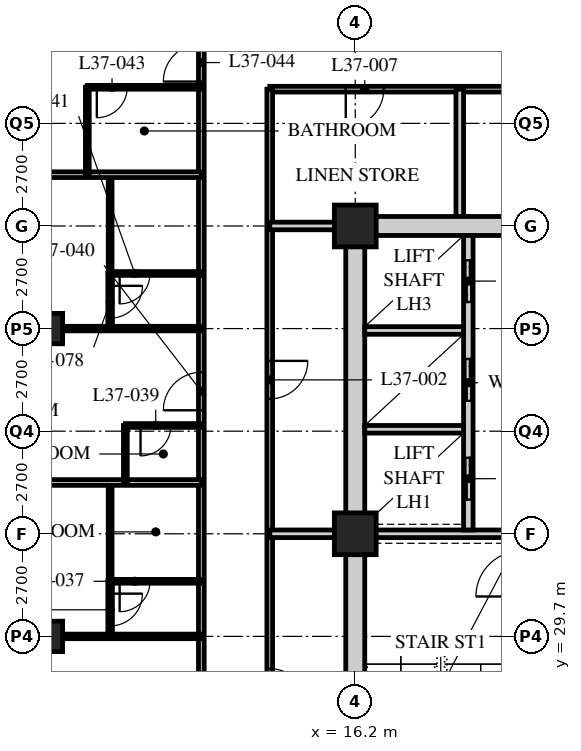
"""IFC4 building model, lengths in metres.
Left out: names, types, materials, properties, quantities, classifications, styles, units other than length and angle.
Written with IfcOpenShell. Run it as: python <this file> out.ifc"""

import sys

from ifc_helpers import new_model, si_unit, direction, frame, frame_2d, origin, origin_2d, place, context, subcontext, project, spatial, rectangle, hollow_rectangle, extrude, element, fill, save


model = new_model("IFC4")
c1 = context("Model", 3, precision=1e-05, world=origin(), true_north=direction((0.0, 1.0)))
c2 = subcontext(c1, "Body", "Model", "MODEL_VIEW")
j1 = project(units=[si_unit("LENGTHUNIT", "METRE"), si_unit("PLANEANGLEUNIT", "RADIAN")], contexts=[c1])
p1 = place(None, origin())
s1 = spatial("IfcSite", under=j1, at=p1, CompositionType="ELEMENT")
p2 = place(p1, origin())
s2 = spatial("IfcBuilding", under=s1, at=p2, CompositionType="ELEMENT")
p3 = place(p2, frame((0.0, 0.0, 144.2)))
s3 = spatial("IfcBuildingStorey", under=s2, at=p3, CompositionType="ELEMENT", Elevation=144.2)
for number, where, z_axis, x_axis in (
    (1, (8.1, 29.7, 0.0), (0.0, 0.0, 1.0), (1.0, 0.0, 0.0)),
    (2, (8.1, 37.8, 0.0), (0.0, 0.0, 1.0), (1.0, 0.0, 0.0)),
):
    element("IfcColumn", number, at=place(p3, frame(where, z_axis=z_axis, x_axis=x_axis)), inside=s3, PredefinedType="COLUMN", context=c2, shape_type="SweptSolid", body=[
        extrude(hollow_rectangle(XDim=0.8, YDim=0.8, WallThickness=0.08, at=origin_2d()), origin(), (0.0, 0.0, 1.0), 3.4),
    ])
for number, where, z_axis, x_axis in (
    (3, (16.2, 32.4, 0.0), (0.0, 0.0, 1.0), (1.0, 0.0, 0.0)),
    (4, (16.2, 40.5, 0.0), (0.0, 0.0, 1.0), (1.0, 0.0, 0.0)),
):
    element("IfcColumn", number, at=place(p3, frame(where, z_axis=z_axis, x_axis=x_axis)), inside=s3, PredefinedType="COLUMN", context=c2, shape_type="SweptSolid", body=[
        extrude(hollow_rectangle(XDim=1.1, YDim=1.1, WallThickness=0.1, at=origin_2d()), origin(), (0.0, 0.0, 1.0), 3.4),
    ])
p4 = place(p3, frame((12.15, 21.6, 0.0), z_axis=(0.0, 0.0, 1.0), x_axis=(0.0, 1.0, 0.0)))
e5 = element("IfcWall", 5, at=p4, inside=s3, PredefinedType="PARTITIONING", context=c2, shape_type="SweptSolid", body=[
    extrude(rectangle(XDim=24.3, YDim=0.15, at=frame_2d((12.15, 0.0))), origin(), (0.0, 0.0, 1.0), 3.19),
])
p5 = place(p4, frame((5.575, 0.0, 0.0)))
e6 = element("IfcOpeningElement", 6, at=p5, cuts=e5, PredefinedType="OPENING", context=c2, shape_type="SweptSolid", body=[
    extrude(rectangle(XDim=1.0, YDim=2.1, at=frame_2d((0.5, 1.05))), frame((0.0, 0.085, 0.0), z_axis=(0.0, -1.0, 0.0), x_axis=(1.0, 0.0, 0.0)), (0.0, 0.0, 1.0), 0.17),
])
p6 = place(p4, frame((14.05, 0.0, 0.0)))
e7 = element("IfcOpeningElement", 7, at=p6, cuts=e5, PredefinedType="OPENING", context=c2, shape_type="SweptSolid", body=[
    extrude(rectangle(XDim=1.0, YDim=2.1, at=frame_2d((0.5, 1.05))), frame((0.0, 0.085, 0.0), z_axis=(0.0, -1.0, 0.0), x_axis=(1.0, 0.0, 0.0)), (0.0, 0.0, 1.0), 0.17),
])
p7 = place(p4, frame((22.7, 0.0, 0.0)))
e8 = element("IfcOpeningElement", 8, at=p7, cuts=e5, PredefinedType="OPENING", context=c2, shape_type="SweptSolid", body=[
    extrude(rectangle(XDim=1.0, YDim=2.1, at=frame_2d((0.5, 1.05))), frame((0.0, 0.085, 0.0), z_axis=(0.0, -1.0, 0.0), x_axis=(1.0, 0.0, 0.0)), (0.0, 0.0, 1.0), 0.17),
])
p8 = place(p3, frame((27.14, 44.1, 0.0), z_axis=(0.0, 0.0, 1.0), x_axis=(-1.0, 0.0, 0.0)))
e9 = element("IfcWall", 9, at=p8, inside=s3, PredefinedType="PARTITIONING", context=c2, shape_type="SweptSolid", body=[
    extrude(rectangle(XDim=13.19, YDim=0.15, at=frame_2d((6.595, 0.0))), origin(), (0.0, 0.0, 1.0), 3.19),
])
p9 = place(p8, frame((10.19, 0.0, 0.0)))
e10 = element("IfcOpeningElement", 10, at=p9, cuts=e9, PredefinedType="OPENING", context=c2, shape_type="SweptSolid", body=[
    extrude(rectangle(XDim=1.0, YDim=2.1, at=frame_2d((0.5, 1.05))), frame((0.0, 0.085, 0.0), z_axis=(0.0, -1.0, 0.0), x_axis=(1.0, 0.0, 0.0)), (0.0, 0.0, 1.0), 0.17),
])
p10 = place(p8, frame((3.59, 0.0, 0.0)))
e11 = element("IfcOpeningElement", 11, at=p10, cuts=e9, PredefinedType="OPENING", context=c2, shape_type="SweptSolid", body=[
    extrude(rectangle(XDim=1.0, YDim=2.1, at=frame_2d((0.5, 1.05))), frame((0.0, 0.085, 0.0), z_axis=(0.0, -1.0, 0.0), x_axis=(1.0, 0.0, 0.0)), (0.0, 0.0, 1.0), 0.17),
])
p11 = place(p3, frame((13.95, 44.1, 0.0), z_axis=(0.0, 0.0, 1.0), x_axis=(0.0, -1.0, 0.0)))
e12 = element("IfcWall", 12, at=p11, inside=s3, PredefinedType="PARTITIONING", context=c2, shape_type="SweptSolid", body=[
    extrude(rectangle(XDim=19.8, YDim=0.15, at=frame_2d((9.9, 0.0))), origin(), (0.0, 0.0, 1.0), 3.19),
])
p12 = place(p11, frame((15.25, 0.0, 0.0)))
e13 = element("IfcOpeningElement", 13, at=p12, cuts=e12, PredefinedType="OPENING", context=c2, shape_type="SweptSolid", body=[
    extrude(rectangle(XDim=1.0, YDim=2.1, at=frame_2d((0.5, 1.05))), frame((0.0, 0.085, 0.0), z_axis=(0.0, -1.0, 0.0), x_axis=(1.0, 0.0, 0.0)), (0.0, 0.0, 1.0), 0.17),
])
p13 = place(p11, frame((7.15, 0.0, 0.0)))
e14 = element("IfcOpeningElement", 14, at=p13, cuts=e12, PredefinedType="OPENING", context=c2, shape_type="SweptSolid", body=[
    extrude(rectangle(XDim=1.0, YDim=2.1, at=frame_2d((0.5, 1.05))), frame((0.0, 0.085, 0.0), z_axis=(0.0, -1.0, 0.0), x_axis=(1.0, 0.0, 0.0)), (0.0, 0.0, 1.0), 0.17),
])
p14 = place(p3, frame((13.95, 32.4, 0.0), z_axis=(0.0, 0.0, 1.0), x_axis=(1.0, 0.0, 0.0)))
e15 = element("IfcWall", 15, at=p14, inside=s3, PredefinedType="SOLIDWALL", context=c2, shape_type="SweptSolid", body=[
    extrude(rectangle(XDim=2.25, YDim=0.2, at=frame_2d((1.125, 0.0))), origin(), (0.0, 0.0, 1.0), 3.19),
])
p15 = place(p3, frame((18.95, 44.1, 0.0), z_axis=(0.0, 0.0, 1.0), x_axis=(0.0, -1.0, 0.0)))
e16 = element("IfcWall", 16, at=p15, inside=s3, PredefinedType="SOLIDWALL", context=c2, shape_type="SweptSolid", body=[
    extrude(rectangle(XDim=3.6, YDim=0.2, at=frame_2d((1.8, 0.0))), origin(), (0.0, 0.0, 1.0), 3.19),
])
p16 = place(p3, frame((13.95, 40.5, 0.0), z_axis=(0.0, 0.0, 1.0), x_axis=(1.0, 0.0, 0.0)))
e17 = element("IfcWall", 17, at=p16, inside=s3, PredefinedType="SOLIDWALL", context=c2, shape_type="SweptSolid", body=[
    extrude(rectangle(XDim=2.25, YDim=0.2, at=frame_2d((1.125, 0.0))), origin(), (0.0, 0.0, 1.0), 3.19),
])
p17 = place(p3, frame((9.75, 31.15, 0.0), z_axis=(0.0, 0.0, 1.0), x_axis=(0.0, 1.0, 0.0)))
e18 = element("IfcWall", 18, at=p17, inside=s3, PredefinedType="PARTITIONING", context=c2, shape_type="SweptSolid", body=[
    extrude(rectangle(XDim=2.6, YDim=0.1, at=frame_2d((1.3, 0.0))), origin(), (0.0, 0.0, 1.0), 3.19),
])
p18 = place(p3, frame((12.15, 31.15, 0.0), z_axis=(0.0, 0.0, 1.0), x_axis=(-1.0, 0.0, 0.0)))
e19 = element("IfcWall", 19, at=p18, inside=s3, PredefinedType="PARTITIONING", context=c2, shape_type="SweptSolid", body=[
    extrude(rectangle(XDim=2.4, YDim=0.1, at=frame_2d((1.2, 0.0))), origin(), (0.0, 0.0, 1.0), 3.19),
])
p19 = place(p18, frame((1.35, 0.0, 0.0)))
e20 = element("IfcOpeningElement", 20, at=p19, cuts=e19, PredefinedType="OPENING", context=c2, shape_type="SweptSolid", body=[
    extrude(rectangle(XDim=0.8, YDim=2.1, at=frame_2d((0.4, 1.05))), frame((0.0, 0.06, 0.0), z_axis=(0.0, -1.0, 0.0), x_axis=(1.0, 0.0, 0.0)), (0.0, 0.0, 1.0), 0.12),
])
p20 = place(p3, frame((12.15, 29.7, 0.0), z_axis=(0.0, 0.0, 1.0), x_axis=(-1.0, 0.0, 0.0)))
e21 = element("IfcWall", 21, at=p20, inside=s3, PredefinedType="PARTITIONING", context=c2, shape_type="SweptSolid", body=[
    extrude(rectangle(XDim=11.85, YDim=0.12, at=frame_2d((5.925, 0.0))), origin(), (0.0, 0.0, 1.0), 2.42),
])
p21 = place(p20, frame((6.85, 0.0, 0.0)))
e22 = element("IfcOpeningElement", 22, at=p21, cuts=e21, PredefinedType="OPENING", context=c2, shape_type="SweptSolid", body=[
    extrude(rectangle(XDim=0.85, YDim=2.1, at=frame_2d((0.425, 1.05))), frame((0.0, 0.07, 0.0), z_axis=(0.0, -1.0, 0.0), x_axis=(1.0, 0.0, 0.0)), (0.0, 0.0, 1.0), 0.14),
])
p22 = place(p3, frame((12.15, 33.75, 0.0), z_axis=(0.0, 0.0, 1.0), x_axis=(-1.0, 0.0, 0.0)))
e23 = element("IfcWall", 23, at=p22, inside=s3, PredefinedType="PARTITIONING", context=c2, shape_type="SweptSolid", body=[
    extrude(rectangle(XDim=11.85, YDim=0.15, at=frame_2d((5.925, 0.0))), origin(), (0.0, 0.0, 1.0), 3.19),
])
p23 = place(p3, frame((10.15, 33.75, 0.0), z_axis=(0.0, 0.0, 1.0), x_axis=(0.0, 1.0, 0.0)))
e24 = element("IfcWall", 24, at=p23, inside=s3, PredefinedType="PARTITIONING", context=c2, shape_type="SweptSolid", body=[
    extrude(rectangle(XDim=1.5, YDim=0.1, at=frame_2d((0.75, 0.0))), origin(), (0.0, 0.0, 1.0), 3.19),
])
p24 = place(p3, frame((12.15, 35.25, 0.0), z_axis=(0.0, 0.0, 1.0), x_axis=(-1.0, 0.0, 0.0)))
e25 = element("IfcWall", 25, at=p24, inside=s3, PredefinedType="PARTITIONING", context=c2, shape_type="SweptSolid", body=[
    extrude(rectangle(XDim=2.0, YDim=0.1, at=frame_2d((1.0, 0.0))), origin(), (0.0, 0.0, 1.0), 3.19),
])
p25 = place(p24, frame((0.8, 0.0, 0.0)))
e26 = element("IfcOpeningElement", 26, at=p25, cuts=e25, PredefinedType="OPENING", context=c2, shape_type="SweptSolid", body=[
    extrude(rectangle(XDim=0.8, YDim=2.1, at=frame_2d((0.4, 1.05))), frame((0.0, 0.06, 0.0), z_axis=(0.0, -1.0, 0.0), x_axis=(1.0, 0.0, 0.0)), (0.0, 0.0, 1.0), 0.12),
])
p26 = place(p3, frame((9.75, 39.25, 0.0), z_axis=(0.0, 0.0, 1.0), x_axis=(0.0, 1.0, 0.0)))
e27 = element("IfcWall", 27, at=p26, inside=s3, PredefinedType="PARTITIONING", context=c2, shape_type="SweptSolid", body=[
    extrude(rectangle(XDim=2.6, YDim=0.1, at=frame_2d((1.3, 0.0))), origin(), (0.0, 0.0, 1.0), 3.19),
])
p27 = place(p3, frame((12.15, 39.25, 0.0), z_axis=(0.0, 0.0, 1.0), x_axis=(-1.0, 0.0, 0.0)))
e28 = element("IfcWall", 28, at=p27, inside=s3, PredefinedType="PARTITIONING", context=c2, shape_type="SweptSolid", body=[
    extrude(rectangle(XDim=2.4, YDim=0.1, at=frame_2d((1.2, 0.0))), origin(), (0.0, 0.0, 1.0), 3.19),
])
p28 = place(p27, frame((1.35, 0.0, 0.0)))
e29 = element("IfcOpeningElement", 29, at=p28, cuts=e28, PredefinedType="OPENING", context=c2, shape_type="SweptSolid", body=[
    extrude(rectangle(XDim=0.8, YDim=2.1, at=frame_2d((0.4, 1.05))), frame((0.0, 0.06, 0.0), z_axis=(0.0, -1.0, 0.0), x_axis=(1.0, 0.0, 0.0)), (0.0, 0.0, 1.0), 0.12),
])
p29 = place(p3, frame((12.15, 37.8, 0.0), z_axis=(0.0, 0.0, 1.0), x_axis=(-1.0, 0.0, 0.0)))
e30 = element("IfcWall", 30, at=p29, inside=s3, PredefinedType="PARTITIONING", context=c2, shape_type="SweptSolid", body=[
    extrude(rectangle(XDim=11.85, YDim=0.12, at=frame_2d((5.925, 0.0))), origin(), (0.0, 0.0, 1.0), 2.42),
])
p30 = place(p29, frame((6.85, 0.0, 0.0)))
e31 = element("IfcOpeningElement", 31, at=p30, cuts=e30, PredefinedType="OPENING", context=c2, shape_type="SweptSolid", body=[
    extrude(rectangle(XDim=0.85, YDim=2.1, at=frame_2d((0.425, 1.05))), frame((0.0, 0.07, 0.0), z_axis=(0.0, -1.0, 0.0), x_axis=(1.0, 0.0, 0.0)), (0.0, 0.0, 1.0), 0.14),
])
p31 = place(p3, frame((12.15, 41.85, 0.0), z_axis=(0.0, 0.0, 1.0), x_axis=(-1.0, 0.0, 0.0)))
e32 = element("IfcWall", 32, at=p31, inside=s3, PredefinedType="PARTITIONING", context=c2, shape_type="SweptSolid", body=[
    extrude(rectangle(XDim=11.85, YDim=0.15, at=frame_2d((5.925, 0.0))), origin(), (0.0, 0.0, 1.0), 3.19),
])
p32 = place(p3, frame((9.15, 41.85, 0.0), z_axis=(0.0, 0.0, 1.0), x_axis=(0.0, 1.0, 0.0)))
e33 = element("IfcWall", 33, at=p32, inside=s3, PredefinedType="PARTITIONING", context=c2, shape_type="SweptSolid", body=[
    extrude(rectangle(XDim=2.3, YDim=0.1, at=frame_2d((1.15, 0.0))), origin(), (0.0, 0.0, 1.0), 3.19),
])
p33 = place(p3, frame((12.15, 44.15, 0.0), z_axis=(0.0, 0.0, 1.0), x_axis=(-1.0, 0.0, 0.0)))
e34 = element("IfcWall", 34, at=p33, inside=s3, PredefinedType="PARTITIONING", context=c2, shape_type="SweptSolid", body=[
    extrude(rectangle(XDim=3.0, YDim=0.1, at=frame_2d((1.5, 0.0))), origin(), (0.0, 0.0, 1.0), 3.19),
])
p34 = place(p33, frame((1.95, 0.0, 0.0)))
e35 = element("IfcOpeningElement", 35, at=p34, cuts=e34, PredefinedType="OPENING", context=c2, shape_type="SweptSolid", body=[
    extrude(rectangle(XDim=0.8, YDim=2.1, at=frame_2d((0.4, 1.05))), frame((0.0, 0.06, 0.0), z_axis=(0.0, -1.0, 0.0), x_axis=(1.0, 0.0, 0.0)), (0.0, 0.0, 1.0), 0.12),
])
p35 = place(p3, frame((9.75, 29.7, 0.0), z_axis=(0.0, 0.0, 1.0), x_axis=(0.0, 1.0, 0.0)))
e36 = element("IfcWall", 36, at=p35, inside=s3, PredefinedType="PARTITIONING", context=c2, shape_type="SweptSolid", body=[
    extrude(rectangle(XDim=1.46, YDim=0.12, at=frame_2d((0.73, 0.0))), origin(), (0.0, 0.0, 1.0), 3.19),
])
p36 = place(p35, frame((0.275, 0.0, 0.0)))
e37 = element("IfcOpeningElement", 37, at=p36, cuts=e36, PredefinedType="OPENING", context=c2, shape_type="SweptSolid", body=[
    extrude(rectangle(XDim=0.85, YDim=2.1, at=frame_2d((0.425, 1.05))), frame((0.0, 0.07, 0.0), z_axis=(0.0, -1.0, 0.0), x_axis=(1.0, 0.0, 0.0)), (0.0, 0.0, 1.0), 0.14),
])
p37 = place(p3, frame((9.75, 37.8, 0.0), z_axis=(0.0, 0.0, 1.0), x_axis=(0.0, 1.0, 0.0)))
e38 = element("IfcWall", 38, at=p37, inside=s3, PredefinedType="PARTITIONING", context=c2, shape_type="SweptSolid", body=[
    extrude(rectangle(XDim=1.46, YDim=0.12, at=frame_2d((0.73, 0.0))), origin(), (0.0, 0.0, 1.0), 3.19),
])
p38 = place(p37, frame((0.275, 0.0, 0.0)))
e39 = element("IfcOpeningElement", 39, at=p38, cuts=e38, PredefinedType="OPENING", context=c2, shape_type="SweptSolid", body=[
    extrude(rectangle(XDim=0.85, YDim=2.1, at=frame_2d((0.425, 1.05))), frame((0.0, 0.07, 0.0), z_axis=(0.0, -1.0, 0.0), x_axis=(1.0, 0.0, 0.0)), (0.0, 0.0, 1.0), 0.14),
])
p39 = place(p3, frame((15.95, 40.5, 0.0), z_axis=(0.0, 0.0, 1.0), x_axis=(1.0, 0.0, 0.0)))
e40 = element("IfcWall", 40, at=p39, inside=s3, PredefinedType="SOLIDWALL", context=c2, shape_type="SweptSolid", body=[
    extrude(rectangle(XDim=24.8, YDim=0.5, at=frame_2d((12.4, 0.0))), origin(), (0.0, 0.0, 1.0), 2.42),
])
p40 = place(p39, frame((11.5, 0.0, 0.0)))
e41 = element("IfcOpeningElement", 41, at=p40, cuts=e40, PredefinedType="OPENING", context=c2, shape_type="SweptSolid", body=[
    extrude(rectangle(XDim=1.8, YDim=2.4, at=frame_2d((0.9, 1.2))), frame((0.0, 0.26, 0.0), z_axis=(0.0, -1.0, 0.0), x_axis=(1.0, 0.0, 0.0)), (0.0, 0.0, 1.0), 0.52),
])
p41 = place(p3, frame((16.2, 24.55, 0.0), z_axis=(0.0, 0.0, 1.0), x_axis=(0.0, 1.0, 0.0)))
e42 = element("IfcWall", 42, at=p41, inside=s3, PredefinedType="SOLIDWALL", context=c2, shape_type="SweptSolid", body=[
    extrude(rectangle(XDim=15.7, YDim=0.5, at=frame_2d((7.85, 0.0))), origin(), (0.0, 0.0, 1.0), 2.42),
])
p42 = place(p3, frame((16.45, 32.4, 0.0), z_axis=(0.0, 0.0, 1.0), x_axis=(1.0, 0.0, 0.0)))
e43 = element("IfcWall", 43, at=p42, inside=s3, PredefinedType="SOLIDWALL", context=c2, shape_type="SweptSolid", body=[
    extrude(rectangle(XDim=7.95, YDim=0.2, at=frame_2d((3.975, 0.0))), origin(), (0.0, 0.0, 1.0), 2.578),
])
p43 = place(p3, frame((19.175, 32.5, 0.0), z_axis=(0.0, 0.0, 1.0), x_axis=(0.0, 1.0, 0.0)))
e44 = element("IfcWall", 44, at=p43, inside=s3, PredefinedType="SOLIDWALL", context=c2, shape_type="SweptSolid", body=[
    extrude(rectangle(XDim=7.75, YDim=0.25, at=frame_2d((3.875, 0.0))), origin(), (0.0, 0.0, 1.0), 3.19),
])
p44 = place(p43, frame((0.8, 0.0, 0.0)))
e45 = element("IfcOpeningElement", 45, at=p44, cuts=e44, PredefinedType="OPENING", context=c2, shape_type="SweptSolid", body=[
    extrude(rectangle(XDim=1.1, YDim=2.4, at=frame_2d((0.55, 1.2))), frame((0.0, 0.135, 0.0), z_axis=(0.0, -1.0, 0.0), x_axis=(1.0, 0.0, 0.0)), (0.0, 0.0, 1.0), 0.27),
])
p45 = place(p43, frame((3.4, 0.0, 0.0)))
e46 = element("IfcOpeningElement", 46, at=p45, cuts=e44, PredefinedType="OPENING", context=c2, shape_type="SweptSolid", body=[
    extrude(rectangle(XDim=1.1, YDim=2.4, at=frame_2d((0.55, 1.2))), frame((0.0, 0.135, 0.0), z_axis=(0.0, -1.0, 0.0), x_axis=(1.0, 0.0, 0.0)), (0.0, 0.0, 1.0), 0.27),
])
p46 = place(p43, frame((6.0, 0.0, 0.0)))
e47 = element("IfcOpeningElement", 47, at=p46, cuts=e44, PredefinedType="OPENING", context=c2, shape_type="SweptSolid", body=[
    extrude(rectangle(XDim=1.1, YDim=2.4, at=frame_2d((0.55, 1.2))), frame((0.0, 0.135, 0.0), z_axis=(0.0, -1.0, 0.0), x_axis=(1.0, 0.0, 0.0)), (0.0, 0.0, 1.0), 0.27),
])
for number, where, z_axis, x_axis in (
    (48, (16.45, 35.15, 0.0), (0.0, 0.0, 1.0), (1.0, 0.0, 0.0)),
    (49, (16.45, 37.75, 0.0), (0.0, 0.0, 1.0), (1.0, 0.0, 0.0)),
):
    element("IfcWall", number, at=place(p3, frame(where, z_axis=z_axis, x_axis=x_axis)), inside=s3, PredefinedType="SOLIDWALL", context=c2, shape_type="SweptSolid", body=[
        extrude(rectangle(XDim=2.6, YDim=0.2, at=frame_2d((1.3, 0.0))), origin(), (0.0, 0.0, 1.0), 3.19),
    ])
p47 = place(p12, origin())
e50 = element("IfcDoor", 50, at=p47, inside=s3, OperationType="SINGLE_SWING_RIGHT", PredefinedType="DOOR", context=c2, shape_type="SweptSolid", body=[
    extrude(rectangle(XDim=1.0, YDim=2.1, at=frame_2d((0.5, 1.05))), frame((0.0, 0.025, 0.0), z_axis=(0.0, -1.0, 0.0), x_axis=(1.0, 0.0, 0.0)), (0.0, 0.0, 1.0), 0.05),
])
fill(e13, e50)
p48 = place(p13, origin())
e51 = element("IfcDoor", 51, at=p48, inside=s3, OperationType="SINGLE_SWING_LEFT", PredefinedType="DOOR", context=c2, shape_type="SweptSolid", body=[
    extrude(rectangle(XDim=1.0, YDim=2.1, at=frame_2d((0.5, 1.05))), frame((0.0, 0.025, 0.0), z_axis=(0.0, -1.0, 0.0), x_axis=(1.0, 0.0, 0.0)), (0.0, 0.0, 1.0), 0.05),
])
fill(e14, e51)
p49 = place(p9, origin())
e52 = element("IfcDoor", 52, at=p49, inside=s3, OperationType="SINGLE_SWING_RIGHT", PredefinedType="DOOR", context=c2, shape_type="SweptSolid", body=[
    extrude(rectangle(XDim=1.0, YDim=2.1, at=frame_2d((0.5, 1.05))), frame((0.0, 0.025, 0.0), z_axis=(0.0, -1.0, 0.0), x_axis=(1.0, 0.0, 0.0)), (0.0, 0.0, 1.0), 0.05),
])
fill(e10, e52)
p50 = place(p19, origin())
e53 = element("IfcDoor", 53, at=p50, inside=s3, OperationType="SINGLE_SWING_RIGHT", PredefinedType="DOOR", context=c2, shape_type="SweptSolid", body=[
    extrude(rectangle(XDim=0.8, YDim=2.1, at=frame_2d((0.4, 1.05))), frame((0.0, 0.025, 0.0), z_axis=(0.0, -1.0, 0.0), x_axis=(1.0, 0.0, 0.0)), (0.0, 0.0, 1.0), 0.05),
])
fill(e20, e53)
p51 = place(p25, origin())
e54 = element("IfcDoor", 54, at=p51, inside=s3, OperationType="SINGLE_SWING_RIGHT", PredefinedType="DOOR", context=c2, shape_type="SweptSolid", body=[
    extrude(rectangle(XDim=0.8, YDim=2.1, at=frame_2d((0.4, 1.05))), frame((0.0, 0.025, 0.0), z_axis=(0.0, -1.0, 0.0), x_axis=(1.0, 0.0, 0.0)), (0.0, 0.0, 1.0), 0.05),
])
fill(e26, e54)
p52 = place(p6, origin())
e55 = element("IfcDoor", 55, at=p52, inside=s3, OperationType="SINGLE_SWING_LEFT", PredefinedType="DOOR", context=c2, shape_type="SweptSolid", body=[
    extrude(rectangle(XDim=1.0, YDim=2.1, at=frame_2d((0.5, 1.05))), frame((0.0, 0.025, 0.0), z_axis=(0.0, -1.0, 0.0), x_axis=(1.0, 0.0, 0.0)), (0.0, 0.0, 1.0), 0.05),
])
fill(e7, e55)
p53 = place(p28, origin())
e56 = element("IfcDoor", 56, at=p53, inside=s3, OperationType="SINGLE_SWING_RIGHT", PredefinedType="DOOR", context=c2, shape_type="SweptSolid", body=[
    extrude(rectangle(XDim=0.8, YDim=2.1, at=frame_2d((0.4, 1.05))), frame((0.0, 0.025, 0.0), z_axis=(0.0, -1.0, 0.0), x_axis=(1.0, 0.0, 0.0)), (0.0, 0.0, 1.0), 0.05),
])
fill(e29, e56)
p54 = place(p34, origin())
e57 = element("IfcDoor", 57, at=p54, inside=s3, OperationType="SINGLE_SWING_RIGHT", PredefinedType="DOOR", context=c2, shape_type="SweptSolid", body=[
    extrude(rectangle(XDim=0.8, YDim=2.1, at=frame_2d((0.4, 1.05))), frame((0.0, 0.025, 0.0), z_axis=(0.0, -1.0, 0.0), x_axis=(1.0, 0.0, 0.0)), (0.0, 0.0, 1.0), 0.05),
])
fill(e35, e57)
p55 = place(p7, origin())
e58 = element("IfcDoor", 58, at=p55, inside=s3, OperationType="SINGLE_SWING_LEFT", PredefinedType="DOOR", context=c2, shape_type="SweptSolid", body=[
    extrude(rectangle(XDim=1.0, YDim=2.1, at=frame_2d((0.5, 1.05))), frame((0.0, 0.025, 0.0), z_axis=(0.0, -1.0, 0.0), x_axis=(1.0, 0.0, 0.0)), (0.0, 0.0, 1.0), 0.05),
])
fill(e8, e58)
p56 = place(p36, origin())
e59 = element("IfcDoor", 59, at=p56, inside=s3, OperationType="SINGLE_SWING_LEFT", PredefinedType="DOOR", context=c2, shape_type="SweptSolid", body=[
    extrude(rectangle(XDim=0.85, YDim=2.1, at=frame_2d((0.425, 1.05))), frame((0.0, 0.025, 0.0), z_axis=(0.0, -1.0, 0.0), x_axis=(1.0, 0.0, 0.0)), (0.0, 0.0, 1.0), 0.05),
])
fill(e37, e59)
p57 = place(p38, origin())
e60 = element("IfcDoor", 60, at=p57, inside=s3, OperationType="SINGLE_SWING_LEFT", PredefinedType="DOOR", context=c2, shape_type="SweptSolid", body=[
    extrude(rectangle(XDim=0.85, YDim=2.1, at=frame_2d((0.425, 1.05))), frame((0.0, 0.025, 0.0), z_axis=(0.0, -1.0, 0.0), x_axis=(1.0, 0.0, 0.0)), (0.0, 0.0, 1.0), 0.05),
])
fill(e39, e60)
p58 = place(p44, origin())
e61 = element("IfcDoor", 61, at=p58, inside=s3, OperationType="DOUBLE_DOOR_SLIDING", PredefinedType="DOOR", context=c2, shape_type="SweptSolid", body=[
    extrude(rectangle(XDim=1.1, YDim=2.4, at=frame_2d((0.55, 1.2))), frame((0.0, 0.025, 0.0), z_axis=(0.0, -1.0, 0.0), x_axis=(1.0, 0.0, 0.0)), (0.0, 0.0, 1.0), 0.05),
])
fill(e45, e61)
p59 = place(p45, origin())
e62 = element("IfcDoor", 62, at=p59, inside=s3, OperationType="DOUBLE_DOOR_SLIDING", PredefinedType="DOOR", context=c2, shape_type="SweptSolid", body=[
    extrude(rectangle(XDim=1.1, YDim=2.4, at=frame_2d((0.55, 1.2))), frame((0.0, 0.025, 0.0), z_axis=(0.0, -1.0, 0.0), x_axis=(1.0, 0.0, 0.0)), (0.0, 0.0, 1.0), 0.05),
])
fill(e46, e62)
p60 = place(p46, origin())
e63 = element("IfcDoor", 63, at=p60, inside=s3, OperationType="DOUBLE_DOOR_SLIDING", PredefinedType="DOOR", context=c2, shape_type="SweptSolid", body=[
    extrude(rectangle(XDim=1.1, YDim=2.4, at=frame_2d((0.55, 1.2))), frame((0.0, 0.025, 0.0), z_axis=(0.0, -1.0, 0.0), x_axis=(1.0, 0.0, 0.0)), (0.0, 0.0, 1.0), 0.05),
])
fill(e47, e63)
save(model, sys.argv[1])
